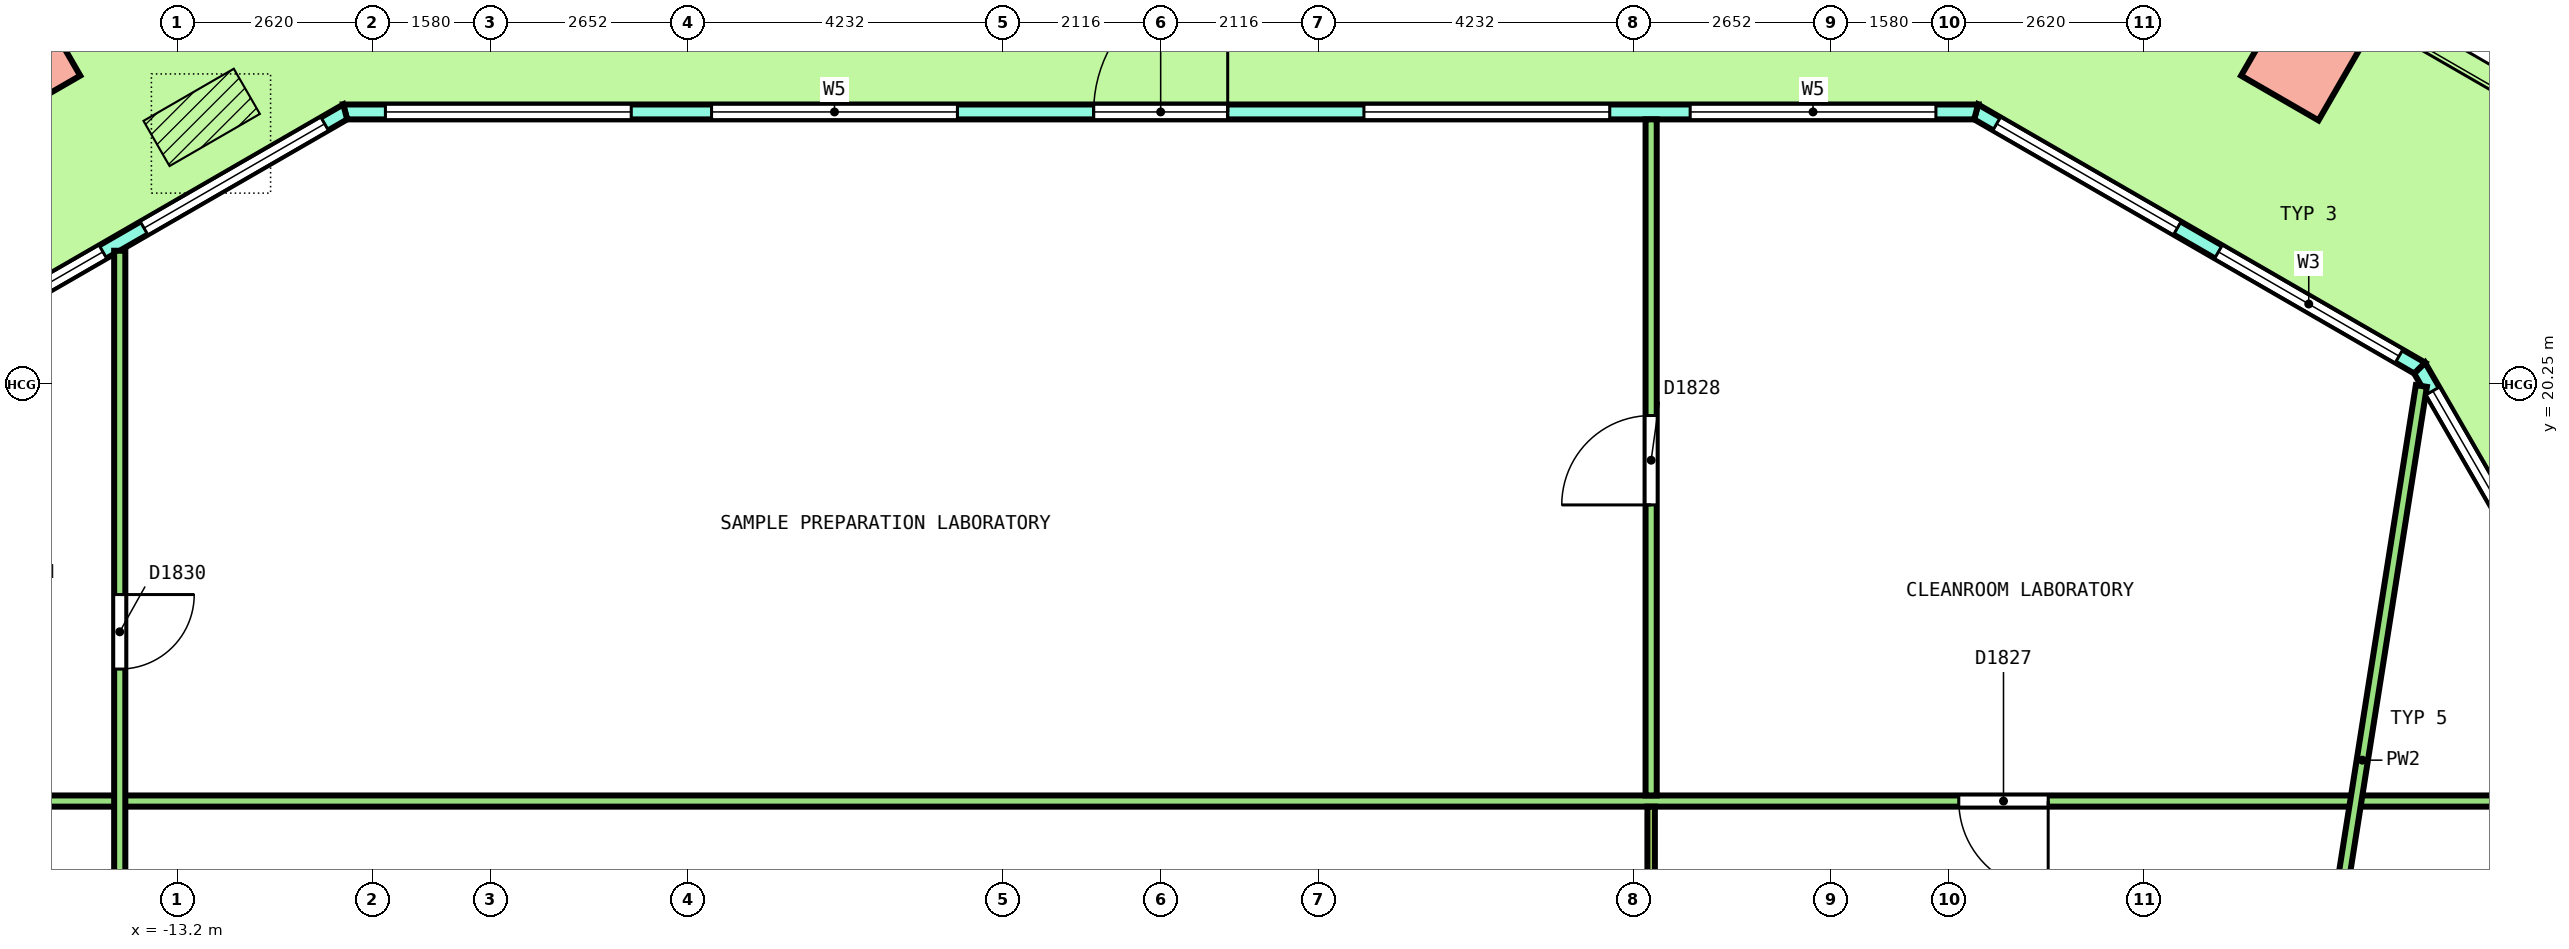
"""IFC4 building model, lengths in metres.
Left out: names, types, materials, properties, quantities, classifications, styles, units other than length and angle.
Written with IfcOpenShell. Run it as: python <this file> out.ifc"""

import sys

from ifc_helpers import new_model, si_unit, direction, frame, frame_2d, origin, origin_2d, place, context, subcontext, project, spatial, polyline, rectangle, outline, extrude, element, fill, save


model = new_model("IFC4")
c1 = context("Model", 3, precision=1e-05, world=origin(), true_north=direction((0.0, 1.0)))
c2 = subcontext(c1, "Body", "Model", "MODEL_VIEW")
j1 = project(units=[si_unit("LENGTHUNIT", "METRE"), si_unit("PLANEANGLEUNIT", "RADIAN")], contexts=[c1])
p1 = place(None, origin())
s1 = spatial("IfcSite", under=j1, at=p1, CompositionType="ELEMENT")
p2 = place(p1, origin())
s2 = spatial("IfcBuilding", under=s1, at=p2, CompositionType="ELEMENT")
p3 = place(p2, frame((0.0, 0.0, 176.0)))
s3 = spatial("IfcBuildingStorey", under=s2, at=p3, CompositionType="ELEMENT", Elevation=176.0)
for number, where, z_axis, x_axis in (
    (1, (15.324, 24.606, 0.0), (0.036, 0.0, 0.999), (-0.865, 0.5, 0.031)),
    (2, (-15.324, 24.606, 0.0), (-0.036, 0.0, 0.999), (-0.865, -0.5, -0.031)),
):
    element("IfcColumn", number, at=place(p3, frame(where, z_axis=z_axis, x_axis=x_axis)), inside=s3, PredefinedType="COLUMN", context=c2, shape_type="SweptSolid", body=[
        extrude(rectangle(XDim=1.2, YDim=1.2, at=origin_2d()), origin(), (0.0, 0.0, 1.0), 4.053),
    ])
p4 = place(p3, frame((26.172, 4.405, 0.0), z_axis=(0.0, 0.0, 1.0), x_axis=(-0.500000942564, 0.866024859594, 0.0)))
e3 = element("IfcWall", 3, at=p4, inside=s3, PredefinedType="SOLIDWALL", context=c2, shape_type="SweptSolid", body=[
    extrude(outline(polyline([(-0.027, -0.1), (1.006, -0.1), (2.039, -0.1), (3.072, -0.1), (4.105, -0.1), (5.138, -0.1), (6.172, -0.1), (7.205, -0.1), (8.238, -0.1), (9.271, -0.1), (10.304, -0.1), (11.337, -0.1), (12.37, -0.1), (13.403, -0.1), (14.436, -0.1), (15.469, -0.1), (16.502, -0.1), (17.535, -0.1), (18.568, -0.1), (18.515, 0.1), (17.488, 0.1), (16.46, 0.1), (15.433, 0.1), (14.406, 0.1), (13.379, 0.1), (12.352, 0.1), (11.325, 0.1), (10.298, 0.1), (9.271, 0.1), (8.244, 0.1), (7.217, 0.1), (6.189, 0.1), (5.162, 0.1), (4.135, 0.1), (3.108, 0.1), (2.081, 0.1), (1.054, 0.1), (0.027, 0.1), (-0.027, -0.1)])), origin(), (0.0, 0.0, 1.0), 4.1),
])
p5 = place(p4, frame((0.354, 0.0, 0.1)))
e4 = element("IfcOpeningElement", 4, at=p5, cuts=e3, PredefinedType="OPENING", context=c2, shape_type="SweptSolid", body=[
    extrude(rectangle(XDim=3.0, YDim=2.9, at=frame_2d((1.5, 1.45))), frame((0.0, 0.11, 0.0), z_axis=(0.0, -1.0, 0.0), x_axis=(1.0, 0.0, 0.0)), (0.0, 0.0, 1.0), 0.22),
])
p6 = place(p4, frame((4.062, 0.0, 0.1)))
e5 = element("IfcOpeningElement", 5, at=p6, cuts=e3, PredefinedType="OPENING", context=c2, shape_type="SweptSolid", body=[
    extrude(rectangle(XDim=3.0, YDim=2.9, at=frame_2d((1.5, 1.45))), frame((0.0, 0.11, 0.0), z_axis=(0.0, -1.0, 0.0), x_axis=(1.0, 0.0, 0.0)), (0.0, 0.0, 1.0), 0.22),
])
p7 = place(p4, frame((8.371, 0.0, 0.0)))
e6 = element("IfcOpeningElement", 6, at=p7, cuts=e3, PredefinedType="OPENING", context=c2, shape_type="SweptSolid", body=[
    extrude(rectangle(XDim=1.8, YDim=2.4, at=frame_2d((0.9, 1.2))), frame((0.0, 0.11, 0.0), z_axis=(0.0, -1.0, 0.0), x_axis=(1.0, 0.0, 0.0)), (0.0, 0.0, 1.0), 0.22),
])
p8 = place(p4, frame((8.371, 0.0, 2.55)))
e7 = element("IfcOpeningElement", 7, at=p8, cuts=e3, PredefinedType="OPENING", context=c2, shape_type="SweptSolid", body=[
    extrude(rectangle(XDim=1.8, YDim=0.45, at=frame_2d((0.9, 0.225))), frame((0.0, 0.11, 0.0), z_axis=(0.0, -1.0, 0.0), x_axis=(1.0, 0.0, 0.0)), (0.0, 0.0, 1.0), 0.22),
])
p9 = place(p4, frame((11.479, 0.0, 0.1)))
e8 = element("IfcOpeningElement", 8, at=p9, cuts=e3, PredefinedType="OPENING", context=c2, shape_type="SweptSolid", body=[
    extrude(rectangle(XDim=3.0, YDim=2.9, at=frame_2d((1.5, 1.45))), frame((0.0, 0.11, 0.0), z_axis=(0.0, -1.0, 0.0), x_axis=(1.0, 0.0, 0.0)), (0.0, 0.0, 1.0), 0.22),
])
p10 = place(p4, frame((15.188, 0.0, 0.1)))
e9 = element("IfcOpeningElement", 9, at=p10, cuts=e3, PredefinedType="OPENING", context=c2, shape_type="SweptSolid", body=[
    extrude(rectangle(XDim=3.0, YDim=2.9, at=frame_2d((1.5, 1.45))), frame((0.0, 0.11, 0.0), z_axis=(0.0, -1.0, 0.0), x_axis=(1.0, 0.0, 0.0)), (0.0, 0.0, 1.0), 0.22),
])
p11 = place(p3, frame((16.901, 20.463, 0.0), z_axis=(0.0, 0.0, 1.0), x_axis=(-0.866029458321, 0.49999297727, 0.0)))
e10 = element("IfcWall", 10, at=p11, inside=s3, PredefinedType="SOLIDWALL", context=c2, shape_type="SweptSolid", body=[
    extrude(outline(polyline([(-0.027, -0.1), (1.128, -0.1), (2.282, -0.1), (3.437, -0.1), (4.592, -0.1), (5.747, -0.1), (6.901, -0.1), (6.848, 0.1), (5.711, 0.1), (4.574, 0.1), (3.437, 0.1), (2.301, 0.1), (1.164, 0.1), (0.027, 0.1), (-0.027, -0.1)])), origin(), (0.0, 0.0, 1.0), 4.1),
])
p12 = place(p11, frame((0.319, 0.0, 0.1)))
e11 = element("IfcOpeningElement", 11, at=p12, cuts=e10, PredefinedType="OPENING", context=c2, shape_type="SweptSolid", body=[
    extrude(rectangle(XDim=2.8, YDim=2.9, at=frame_2d((1.4, 1.45))), frame((0.0, 0.11, 0.0), z_axis=(0.0, -1.0, 0.0), x_axis=(1.0, 0.0, 0.0)), (0.0, 0.0, 1.0), 0.22),
])
p13 = place(p11, frame((3.756, 0.0, 0.1)))
e12 = element("IfcOpeningElement", 12, at=p13, cuts=e10, PredefinedType="OPENING", context=c2, shape_type="SweptSolid", body=[
    extrude(rectangle(XDim=2.8, YDim=2.9, at=frame_2d((1.4, 1.45))), frame((0.0, 0.11, 0.0), z_axis=(0.0, -1.0, 0.0), x_axis=(1.0, 0.0, 0.0)), (0.0, 0.0, 1.0), 0.22),
])
p14 = place(p3, frame((10.947, 23.9, 0.0), z_axis=(0.0, 0.0, 1.0), x_axis=(-1.0, 0.0, 0.0)))
e13 = element("IfcWall", 13, at=p14, inside=s3, PredefinedType="SOLIDWALL", context=c2, shape_type="SweptSolid", body=[
    extrude(outline(polyline([(-0.027, -0.1), (1.018, -0.1), (2.063, -0.1), (3.109, -0.1), (4.154, -0.1), (5.199, -0.1), (6.244, -0.1), (7.289, -0.1), (8.334, -0.1), (9.38, -0.1), (10.425, -0.1), (11.47, -0.1), (12.515, -0.1), (13.56, -0.1), (14.605, -0.1), (15.65, -0.1), (16.696, -0.1), (17.741, -0.1), (18.786, -0.1), (19.831, -0.1), (20.876, -0.1), (21.921, -0.1), (21.868, 0.1), (20.828, 0.1), (19.788, 0.1), (18.748, 0.1), (17.708, 0.1), (16.667, 0.1), (15.627, 0.1), (14.587, 0.1), (13.547, 0.1), (12.507, 0.1), (11.467, 0.1), (10.427, 0.1), (9.387, 0.1), (8.347, 0.1), (7.307, 0.1), (6.267, 0.1), (5.227, 0.1), (4.187, 0.1), (3.147, 0.1), (2.107, 0.1), (1.067, 0.1), (0.027, 0.1), (-0.027, -0.1)])), origin(), (0.0, 0.0, 1.0), 4.1),
])
p15 = place(p14, frame((0.54, 0.0, 0.1)))
e14 = element("IfcOpeningElement", 14, at=p15, cuts=e13, PredefinedType="OPENING", context=c2, shape_type="SweptSolid", body=[
    extrude(rectangle(XDim=3.3, YDim=2.9, at=frame_2d((1.65, 1.45))), frame((0.0, 0.11, 0.0), z_axis=(0.0, -1.0, 0.0), x_axis=(1.0, 0.0, 0.0)), (0.0, 0.0, 1.0), 0.22),
])
p16 = place(p14, frame((4.918, 0.0, 0.1)))
e15 = element("IfcOpeningElement", 15, at=p16, cuts=e13, PredefinedType="OPENING", context=c2, shape_type="SweptSolid", body=[
    extrude(rectangle(XDim=3.3, YDim=2.9, at=frame_2d((1.65, 1.45))), frame((0.0, 0.11, 0.0), z_axis=(0.0, -1.0, 0.0), x_axis=(1.0, 0.0, 0.0)), (0.0, 0.0, 1.0), 0.22),
])
p17 = place(p14, frame((10.047, 0.0, 0.0)))
e16 = element("IfcOpeningElement", 16, at=p17, cuts=e13, PredefinedType="OPENING", context=c2, shape_type="SweptSolid", body=[
    extrude(rectangle(XDim=1.8, YDim=2.4, at=frame_2d((0.9, 1.2))), frame((0.0, 0.11, 0.0), z_axis=(0.0, -1.0, 0.0), x_axis=(1.0, 0.0, 0.0)), (0.0, 0.0, 1.0), 0.22),
])
p18 = place(p14, frame((10.047, 0.0, 2.55)))
e17 = element("IfcOpeningElement", 17, at=p18, cuts=e13, PredefinedType="OPENING", context=c2, shape_type="SweptSolid", body=[
    extrude(rectangle(XDim=1.8, YDim=0.45, at=frame_2d((0.9, 0.225))), frame((0.0, 0.11, 0.0), z_axis=(0.0, -1.0, 0.0), x_axis=(1.0, 0.0, 0.0)), (0.0, 0.0, 1.0), 0.22),
])
p19 = place(p14, frame((13.676, 0.0, 0.1)))
e18 = element("IfcOpeningElement", 18, at=p19, cuts=e13, PredefinedType="OPENING", context=c2, shape_type="SweptSolid", body=[
    extrude(rectangle(XDim=3.3, YDim=2.9, at=frame_2d((1.65, 1.45))), frame((0.0, 0.11, 0.0), z_axis=(0.0, -1.0, 0.0), x_axis=(1.0, 0.0, 0.0)), (0.0, 0.0, 1.0), 0.22),
])
p20 = place(p14, frame((18.055, 0.0, 0.1)))
e19 = element("IfcOpeningElement", 19, at=p20, cuts=e13, PredefinedType="OPENING", context=c2, shape_type="SweptSolid", body=[
    extrude(rectangle(XDim=3.3, YDim=2.9, at=frame_2d((1.65, 1.45))), frame((0.0, 0.11, 0.0), z_axis=(0.0, -1.0, 0.0), x_axis=(1.0, 0.0, 0.0)), (0.0, 0.0, 1.0), 0.22),
])
p21 = place(p3, frame((-10.947, 23.9, 0.0), z_axis=(0.0, 0.0, 1.0), x_axis=(-0.866029458321, -0.49999297727, 0.0)))
e20 = element("IfcWall", 20, at=p21, inside=s3, PredefinedType="SOLIDWALL", context=c2, shape_type="SweptSolid", body=[
    extrude(outline(polyline([(-0.027, -0.1), (1.128, -0.1), (2.282, -0.1), (3.437, -0.1), (4.592, -0.1), (5.747, -0.1), (6.901, -0.1), (6.848, 0.1), (5.711, 0.1), (4.574, 0.1), (3.437, 0.1), (2.301, 0.1), (1.164, 0.1), (0.027, 0.1), (-0.027, -0.1)])), origin(), (0.0, 0.0, 1.0), 4.1),
])
p22 = place(p21, frame((0.319, 0.0, 0.1)))
e21 = element("IfcOpeningElement", 21, at=p22, cuts=e20, PredefinedType="OPENING", context=c2, shape_type="SweptSolid", body=[
    extrude(rectangle(XDim=2.8, YDim=2.9, at=frame_2d((1.4, 1.45))), frame((0.0, 0.11, 0.0), z_axis=(0.0, -1.0, 0.0), x_axis=(1.0, 0.0, 0.0)), (0.0, 0.0, 1.0), 0.22),
])
p23 = place(p21, frame((3.756, 0.0, 0.1)))
e22 = element("IfcOpeningElement", 22, at=p23, cuts=e20, PredefinedType="OPENING", context=c2, shape_type="SweptSolid", body=[
    extrude(rectangle(XDim=2.8, YDim=2.9, at=frame_2d((1.4, 1.45))), frame((0.0, 0.11, 0.0), z_axis=(0.0, -1.0, 0.0), x_axis=(1.0, 0.0, 0.0)), (0.0, 0.0, 1.0), 0.22),
])
p24 = place(p3, frame((-19.675, 14.65, 0.0), z_axis=(0.0, 0.0, 1.0), x_axis=(1.0, 0.0, 0.0)))
e23 = element("IfcWall", 23, at=p24, inside=s3, PredefinedType="PARTITIONING", context=c2, shape_type="SweptSolid", body=[
    extrude(rectangle(XDim=39.5, YDim=0.15, at=frame_2d((19.75, 0.0))), origin(), (0.0, 0.0, 1.0), 3.05),
])
p25 = place(p24, frame((30.39, 0.0, 0.0)))
e24 = element("IfcOpeningElement", 24, at=p25, cuts=e23, PredefinedType="OPENING", context=c2, shape_type="SweptSolid", body=[
    extrude(rectangle(XDim=1.2, YDim=2.1, at=frame_2d((0.6, 1.05))), frame((0.0, 0.085, 0.0), z_axis=(0.0, -1.0, 0.0), x_axis=(1.0, 0.0, 0.0)), (0.0, 0.0, 1.0), 0.17),
])
p26 = place(p3, frame((15.338, 10.176, 0.0), z_axis=(0.0, 0.0, 1.0), x_axis=(0.155961340777, 0.987763159965, 0.0)))
e25 = element("IfcWall", 25, at=p26, inside=s3, PredefinedType="PARTITIONING", context=c2, shape_type="SweptSolid", body=[
    extrude(rectangle(XDim=10.17, YDim=0.15, at=frame_2d((5.085, 0.0))), origin(), (0.0, 0.0, 1.0), 3.05),
])
p27 = place(p3, frame((6.584, 14.725, 0.0), z_axis=(0.0, 0.0, 1.0), x_axis=(0.0, 1.0, 0.0)))
e26 = element("IfcWall", 26, at=p27, inside=s3, PredefinedType="PARTITIONING", context=c2, shape_type="SweptSolid", body=[
    extrude(rectangle(XDim=9.075, YDim=0.15, at=frame_2d((4.538, 0.0))), origin(), (0.0, 0.0, 1.0), 3.05),
])
p28 = place(p27, frame((3.9, 0.0, 0.0)))
e27 = element("IfcOpeningElement", 27, at=p28, cuts=e26, PredefinedType="OPENING", context=c2, shape_type="SweptSolid", body=[
    extrude(rectangle(XDim=1.2, YDim=2.1, at=frame_2d((0.6, 1.05))), frame((0.0, 0.085, 0.0), z_axis=(0.0, -1.0, 0.0), x_axis=(1.0, 0.0, 0.0)), (0.0, 0.0, 1.0), 0.17),
])
p29 = place(p3, frame((-13.974, 10.325, 0.0), z_axis=(0.0, 0.0, 1.0), x_axis=(0.0, 1.0, 0.0)))
e28 = element("IfcWall", 28, at=p29, inside=s3, PredefinedType="PARTITIONING", context=c2, shape_type="SweptSolid", body=[
    extrude(rectangle(XDim=11.712, YDim=0.15, at=frame_2d((5.856, 0.0))), origin(), (0.0, 0.0, 1.0), 3.05),
])
p30 = place(p29, frame((6.097, 0.0, 0.0)))
e29 = element("IfcOpeningElement", 29, at=p30, cuts=e28, PredefinedType="OPENING", context=c2, shape_type="SweptSolid", body=[
    extrude(rectangle(XDim=1.0, YDim=2.1, at=frame_2d((0.5, 1.05))), frame((0.0, 0.085, 0.0), z_axis=(0.0, -1.0, 0.0), x_axis=(1.0, 0.0, 0.0)), (0.0, 0.0, 1.0), 0.17),
])
p31 = place(p29, frame((1.22, 0.0, 0.0)))
e30 = element("IfcOpeningElement", 30, at=p31, cuts=e28, PredefinedType="OPENING", context=c2, shape_type="SweptSolid", body=[
    extrude(rectangle(XDim=1.0, YDim=2.1, at=frame_2d((0.5, 1.05))), frame((0.0, 0.085, 0.0), z_axis=(0.0, -1.0, 0.0), x_axis=(1.0, 0.0, 0.0)), (0.0, 0.0, 1.0), 0.17),
])
p32 = place(p3, frame((6.584, 10.325, 0.0), z_axis=(0.0, 0.0, 1.0), x_axis=(0.0, 1.0, 0.0)))
e31 = element("IfcWall", 31, at=p32, inside=s3, PredefinedType="PARTITIONING", context=c2, shape_type="SweptSolid", body=[
    extrude(rectangle(XDim=4.25, YDim=0.1, at=frame_2d((2.125, 0.0))), origin(), (0.0, 0.0, 1.0), 3.05),
])
p33 = place(p10, origin())
e32 = element("IfcWindow", 32, at=p33, inside=s3, PartitioningType="SINGLE_PANEL", PredefinedType="WINDOW", context=c2, shape_type="SweptSolid", body=[
    extrude(rectangle(XDim=3.0, YDim=2.9, at=frame_2d((1.5, 1.45))), frame((0.0, 0.03, 0.0), z_axis=(0.0, -1.0, 0.0), x_axis=(1.0, 0.0, 0.0)), (0.0, 0.0, 1.0), 0.06),
])
fill(e9, e32)
p34 = place(p12, origin())
e33 = element("IfcWindow", 33, at=p34, inside=s3, PartitioningType="SINGLE_PANEL", PredefinedType="WINDOW", context=c2, shape_type="SweptSolid", body=[
    extrude(rectangle(XDim=2.8, YDim=2.9, at=frame_2d((1.4, 1.45))), frame((0.0, 0.03, 0.0), z_axis=(0.0, -1.0, 0.0), x_axis=(1.0, 0.0, 0.0)), (0.0, 0.0, 1.0), 0.06),
])
fill(e11, e33)
p35 = place(p13, origin())
e34 = element("IfcWindow", 34, at=p35, inside=s3, PartitioningType="SINGLE_PANEL", PredefinedType="WINDOW", context=c2, shape_type="SweptSolid", body=[
    extrude(rectangle(XDim=2.8, YDim=2.9, at=frame_2d((1.4, 1.45))), frame((0.0, 0.03, 0.0), z_axis=(0.0, -1.0, 0.0), x_axis=(1.0, 0.0, 0.0)), (0.0, 0.0, 1.0), 0.06),
])
fill(e12, e34)
p36 = place(p15, origin())
e35 = element("IfcWindow", 35, at=p36, inside=s3, PartitioningType="SINGLE_PANEL", PredefinedType="WINDOW", context=c2, shape_type="SweptSolid", body=[
    extrude(rectangle(XDim=3.3, YDim=2.9, at=frame_2d((1.65, 1.45))), frame((0.0, 0.03, 0.0), z_axis=(0.0, -1.0, 0.0), x_axis=(1.0, 0.0, 0.0)), (0.0, 0.0, 1.0), 0.06),
])
fill(e14, e35)
p37 = place(p16, origin())
e36 = element("IfcWindow", 36, at=p37, inside=s3, PartitioningType="SINGLE_PANEL", PredefinedType="WINDOW", context=c2, shape_type="SweptSolid", body=[
    extrude(rectangle(XDim=3.3, YDim=2.9, at=frame_2d((1.65, 1.45))), frame((0.0, 0.03, 0.0), z_axis=(0.0, -1.0, 0.0), x_axis=(1.0, 0.0, 0.0)), (0.0, 0.0, 1.0), 0.06),
])
fill(e15, e36)
p38 = place(p17, origin())
e37 = element("IfcDoor", 37, at=p38, inside=s3, OperationType="DOUBLE_DOOR_SINGLE_SWING", PredefinedType="DOOR", context=c2, shape_type="SweptSolid", body=[
    extrude(rectangle(XDim=1.8, YDim=2.4, at=frame_2d((0.9, 1.2))), frame((0.0, 0.025, 0.0), z_axis=(0.0, -1.0, 0.0), x_axis=(1.0, 0.0, 0.0)), (0.0, 0.0, 1.0), 0.05),
])
fill(e16, e37)
p39 = place(p18, origin())
e38 = element("IfcWindow", 38, at=p39, inside=s3, PartitioningType="SINGLE_PANEL", PredefinedType="WINDOW", context=c2, shape_type="SweptSolid", body=[
    extrude(rectangle(XDim=1.8, YDim=0.45, at=frame_2d((0.9, 0.225))), frame((0.0, 0.03, 0.0), z_axis=(0.0, -1.0, 0.0), x_axis=(1.0, 0.0, 0.0)), (0.0, 0.0, 1.0), 0.06),
])
fill(e17, e38)
p40 = place(p19, origin())
e39 = element("IfcWindow", 39, at=p40, inside=s3, PartitioningType="SINGLE_PANEL", PredefinedType="WINDOW", context=c2, shape_type="SweptSolid", body=[
    extrude(rectangle(XDim=3.3, YDim=2.9, at=frame_2d((1.65, 1.45))), frame((0.0, 0.03, 0.0), z_axis=(0.0, -1.0, 0.0), x_axis=(1.0, 0.0, 0.0)), (0.0, 0.0, 1.0), 0.06),
])
fill(e18, e39)
p41 = place(p20, origin())
e40 = element("IfcWindow", 40, at=p41, inside=s3, PartitioningType="SINGLE_PANEL", PredefinedType="WINDOW", context=c2, shape_type="SweptSolid", body=[
    extrude(rectangle(XDim=3.3, YDim=2.9, at=frame_2d((1.65, 1.45))), frame((0.0, 0.03, 0.0), z_axis=(0.0, -1.0, 0.0), x_axis=(1.0, 0.0, 0.0)), (0.0, 0.0, 1.0), 0.06),
])
fill(e19, e40)
p42 = place(p22, origin())
e41 = element("IfcWindow", 41, at=p42, inside=s3, PartitioningType="SINGLE_PANEL", PredefinedType="WINDOW", context=c2, shape_type="SweptSolid", body=[
    extrude(rectangle(XDim=2.8, YDim=2.9, at=frame_2d((1.4, 1.45))), frame((0.0, 0.03, 0.0), z_axis=(0.0, -1.0, 0.0), x_axis=(1.0, 0.0, 0.0)), (0.0, 0.0, 1.0), 0.06),
])
fill(e21, e41)
p43 = place(p23, origin())
e42 = element("IfcWindow", 42, at=p43, inside=s3, PartitioningType="SINGLE_PANEL", PredefinedType="WINDOW", context=c2, shape_type="SweptSolid", body=[
    extrude(rectangle(XDim=2.8, YDim=2.9, at=frame_2d((1.4, 1.45))), frame((0.0, 0.03, 0.0), z_axis=(0.0, -1.0, 0.0), x_axis=(1.0, 0.0, 0.0)), (0.0, 0.0, 1.0), 0.06),
])
fill(e22, e42)
p44 = place(p25, origin())
e43 = element("IfcDoor", 43, at=p44, inside=s3, OperationType="DOUBLE_DOOR_SINGLE_SWING", PredefinedType="DOOR", context=c2, shape_type="SweptSolid", body=[
    extrude(rectangle(XDim=1.2, YDim=2.1, at=frame_2d((0.6, 1.05))), frame((0.0, 0.025, 0.0), z_axis=(0.0, -1.0, 0.0), x_axis=(1.0, 0.0, 0.0)), (0.0, 0.0, 1.0), 0.05),
])
fill(e24, e43)
p45 = place(p28, origin())
e44 = element("IfcDoor", 44, at=p45, inside=s3, OperationType="DOUBLE_DOOR_SINGLE_SWING", PredefinedType="DOOR", context=c2, shape_type="SweptSolid", body=[
    extrude(rectangle(XDim=1.2, YDim=2.1, at=frame_2d((0.6, 1.05))), frame((0.0, 0.025, 0.0), z_axis=(0.0, -1.0, 0.0), x_axis=(1.0, 0.0, 0.0)), (0.0, 0.0, 1.0), 0.05),
])
fill(e27, e44)
p46 = place(p30, origin())
e45 = element("IfcDoor", 45, at=p46, inside=s3, OperationType="SINGLE_SWING_RIGHT", PredefinedType="DOOR", context=c2, shape_type="SweptSolid", body=[
    extrude(rectangle(XDim=1.0, YDim=2.1, at=frame_2d((0.5, 1.05))), frame((0.0, 0.025, 0.0), z_axis=(0.0, -1.0, 0.0), x_axis=(1.0, 0.0, 0.0)), (0.0, 0.0, 1.0), 0.05),
])
fill(e29, e45)
save(model, sys.argv[1])
